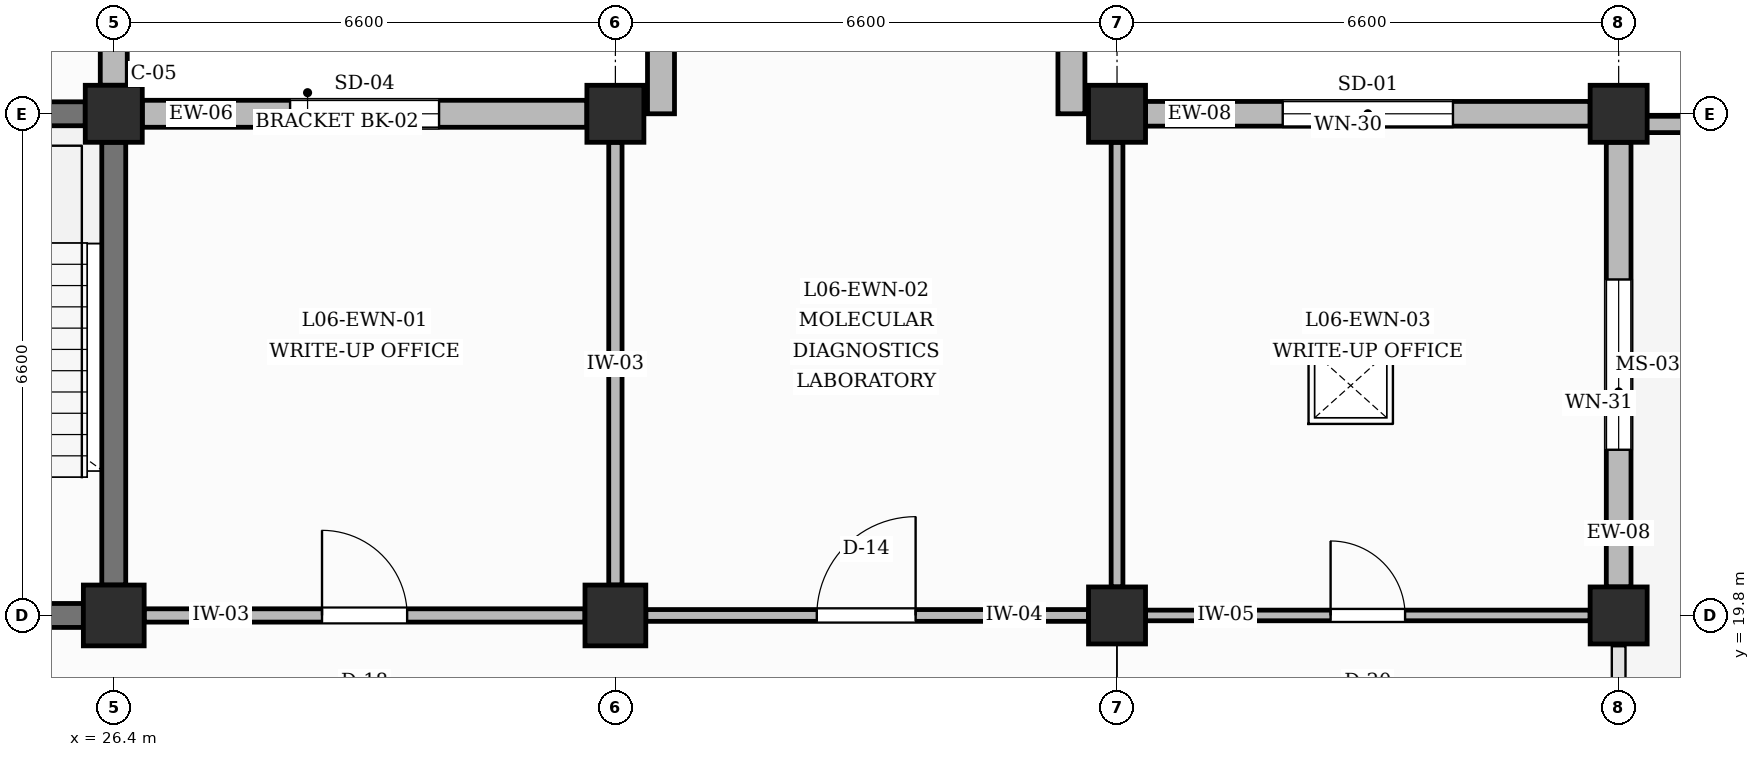
"""IFC4 building model, lengths in metres.
Left out: names, types, materials, properties, quantities, classifications, styles, units other than length and angle.
Written with IfcOpenShell. Run it as: python <this file> out.ifc"""

import sys

from ifc_helpers import new_model, si_unit, direction, frame, frame_2d, origin, origin_2d, place, context, subcontext, project, spatial, rectangle, extrude, element, fill, save


model = new_model("IFC4")
c1 = context("Model", 3, precision=1e-05, world=origin(), true_north=direction((0.0, 1.0)))
c2 = subcontext(c1, "Body", "Model", "MODEL_VIEW")
j1 = project(units=[si_unit("LENGTHUNIT", "METRE"), si_unit("PLANEANGLEUNIT", "RADIAN")], contexts=[c1])
p1 = place(None, origin())
s1 = spatial("IfcSite", under=j1, at=p1, CompositionType="ELEMENT")
p2 = place(p1, origin())
s2 = spatial("IfcBuilding", under=s1, at=p2, CompositionType="ELEMENT")
p3 = place(p2, frame((0.0, 0.0, 27.0)))
s3 = spatial("IfcBuildingStorey", under=s2, at=p3, CompositionType="ELEMENT", Elevation=27.0)
p4 = place(p3, frame((26.4, 19.8, 0.0), z_axis=(0.0, 0.0, 1.0), x_axis=(1.0, 0.0, 0.0)))
e1 = element("IfcColumn", 1, at=p4, inside=s3, PredefinedType="COLUMN", context=c2, shape_type="SweptSolid", body=[
    extrude(rectangle(XDim=0.8, YDim=0.8, at=origin_2d()), origin(), (0.0, 0.0, 1.0), 4.2),
])
p5 = place(p3, frame((26.4, 26.4, 0.0), z_axis=(0.0, 0.0, 1.0), x_axis=(1.0, 0.0, 0.0)))
e2 = element("IfcColumn", 2, at=p5, inside=s3, PredefinedType="COLUMN", context=c2, shape_type="SweptSolid", body=[
    extrude(rectangle(XDim=0.75, YDim=0.75, at=origin_2d()), origin(), (0.0, 0.0, 1.0), 4.2),
])
p6 = place(p3, frame((33.0, 19.8, 0.0), z_axis=(0.0, 0.0, 1.0), x_axis=(1.0, 0.0, 0.0)))
e3 = element("IfcColumn", 3, at=p6, inside=s3, PredefinedType="COLUMN", context=c2, shape_type="SweptSolid", body=[
    extrude(rectangle(XDim=0.8, YDim=0.8, at=origin_2d()), origin(), (0.0, 0.0, 1.0), 4.2),
])
for number, where, z_axis, x_axis in (
    (4, (33.0, 26.4, 0.0), (0.0, 0.0, 1.0), (1.0, 0.0, 0.0)),
    (5, (39.6, 19.8, 0.0), (0.0, 0.0, 1.0), (1.0, 0.0, 0.0)),
    (6, (39.6, 26.4, 0.0), (0.0, 0.0, 1.0), (1.0, 0.0, 0.0)),
    (7, (46.2, 19.8, 0.0), (0.0, 0.0, 1.0), (1.0, 0.0, 0.0)),
    (8, (46.2, 26.4, 0.0), (0.0, 0.0, 1.0), (1.0, 0.0, 0.0)),
):
    element("IfcColumn", number, at=place(p3, frame(where, z_axis=z_axis, x_axis=x_axis)), inside=s3, PredefinedType="COLUMN", context=c2, shape_type="SweptSolid", body=[
        extrude(rectangle(XDim=0.75, YDim=0.75, at=origin_2d()), origin(), (0.0, 0.0, 1.0), 4.2),
    ])
p7 = place(p3, frame((26.4, 26.775, 0.0), z_axis=(0.0, 0.0, 1.0), x_axis=(0.0, 1.0, 0.0)))
e9 = element("IfcWall", 9, at=p7, inside=s3, PredefinedType="SOLIDWALL", context=c2, shape_type="SweptSolid", body=[
    extrude(rectangle(XDim=5.85, YDim=0.355, at=frame_2d((2.925, 0.0))), origin(), (0.0, 0.0, 1.0), 3.27),
])
p8 = place(p7, frame((1.945, 0.0, 0.95)))
e10 = element("IfcOpeningElement", 10, at=p8, cuts=e9, PredefinedType="OPENING", context=c2, shape_type="SweptSolid", body=[
    extrude(rectangle(XDim=1.96, YDim=1.3, at=frame_2d((0.98, 0.65))), frame((0.0, 0.188, 0.0), z_axis=(0.0, -1.0, 0.0), x_axis=(1.0, 0.0, 0.0)), (0.0, 0.0, 1.0), 0.375),
])
p9 = place(p3, frame((26.775, 26.4, 0.0), z_axis=(0.0, 0.0, 1.0), x_axis=(1.0, 0.0, 0.0)))
e11 = element("IfcWall", 11, at=p9, inside=s3, PredefinedType="SOLIDWALL", context=c2, shape_type="SweptSolid", body=[
    extrude(rectangle(XDim=5.85, YDim=0.355, at=frame_2d((2.925, 0.0))), origin(), (0.0, 0.0, 1.0), 3.27),
])
p10 = place(p9, frame((1.945, 0.0, 0.95)))
e12 = element("IfcOpeningElement", 12, at=p10, cuts=e11, PredefinedType="OPENING", context=c2, shape_type="SweptSolid", body=[
    extrude(rectangle(XDim=1.96, YDim=1.96, at=frame_2d((0.98, 0.98))), frame((0.0, 0.188, 0.0), z_axis=(0.0, -1.0, 0.0), x_axis=(1.0, 0.0, 0.0)), (0.0, 0.0, 1.0), 0.375),
])
for number, where, z_axis, x_axis in (
    (13, (33.6, 26.4, 0.0), (0.0, 0.0, 1.0), (0.0, 1.0, 0.0)),
    (14, (39.0, 26.4, 0.0), (0.0, 0.0, 1.0), (0.0, 1.0, 0.0)),
):
    element("IfcWall", number, at=place(p3, frame(where, z_axis=z_axis, x_axis=x_axis)), inside=s3, PredefinedType="SOLIDWALL", context=c2, shape_type="SweptSolid", body=[
        extrude(rectangle(XDim=2.0, YDim=0.355, at=frame_2d((1.0, 0.0))), origin(), (0.0, 0.0, 1.0), 3.27),
    ])
p11 = place(p3, frame((39.975, 26.4, 0.0), z_axis=(0.0, 0.0, 1.0), x_axis=(1.0, 0.0, 0.0)))
e15 = element("IfcWall", 15, at=p11, inside=s3, PredefinedType="SOLIDWALL", context=c2, shape_type="SweptSolid", body=[
    extrude(rectangle(XDim=5.85, YDim=0.325, at=frame_2d((2.925, 0.0))), origin(), (0.0, 0.0, 1.0), 3.27),
])
p12 = place(p11, frame((1.805, 0.0, 0.95)))
e16 = element("IfcOpeningElement", 16, at=p12, cuts=e15, PredefinedType="OPENING", context=c2, shape_type="SweptSolid", body=[
    extrude(rectangle(XDim=2.24, YDim=1.52, at=frame_2d((1.12, 0.76))), frame((0.0, 0.172, 0.0), z_axis=(0.0, -1.0, 0.0), x_axis=(1.0, 0.0, 0.0)), (0.0, 0.0, 1.0), 0.345),
])
p13 = place(p3, frame((46.2, 20.175, 0.0), z_axis=(0.0, 0.0, 1.0), x_axis=(0.0, 1.0, 0.0)))
e17 = element("IfcWall", 17, at=p13, inside=s3, PredefinedType="SOLIDWALL", context=c2, shape_type="SweptSolid", body=[
    extrude(rectangle(XDim=5.85, YDim=0.325, at=frame_2d((2.925, 0.0))), origin(), (0.0, 0.0, 1.0), 3.27),
])
p14 = place(p13, frame((1.805, 0.0, 0.95)))
e18 = element("IfcOpeningElement", 18, at=p14, cuts=e17, PredefinedType="OPENING", context=c2, shape_type="SweptSolid", body=[
    extrude(rectangle(XDim=2.24, YDim=1.74, at=frame_2d((1.12, 0.87))), frame((0.0, 0.172, 0.0), z_axis=(0.0, -1.0, 0.0), x_axis=(1.0, 0.0, 0.0)), (0.0, 0.0, 1.0), 0.345),
])
p15 = place(p3, frame((46.34, 26.26, 0.0), z_axis=(0.0, 0.0, 1.0), x_axis=(1.0, 0.0, 0.0)))
e19 = element("IfcWall", 19, at=p15, inside=s3, PredefinedType="PARAPET", context=c2, shape_type="SweptSolid", body=[
    extrude(rectangle(XDim=6.32, YDim=0.215, at=frame_2d((3.16, 0.0))), origin(), (0.0, 0.0, 1.0), 1.15),
])
p16 = place(p3, frame((20.2, 19.8, 0.0), z_axis=(0.0, 0.0, 1.0), x_axis=(1.0, 0.0, 0.0)))
e20 = element("IfcWall", 20, at=p16, inside=s3, PredefinedType="SHEAR", context=c2, shape_type="SweptSolid", body=[
    extrude(rectangle(XDim=5.8, YDim=0.315, at=frame_2d((2.9, 0.0))), origin(), (0.0, 0.0, 1.0), 3.17),
])
p17 = place(p16, frame((2.325, 0.0, 0.0)))
e21 = element("IfcOpeningElement", 21, at=p17, cuts=e20, PredefinedType="OPENING", context=c2, shape_type="SweptSolid", body=[
    extrude(rectangle(XDim=1.15, YDim=2.2, at=frame_2d((0.575, 1.1))), frame((0.0, 0.167, 0.0), z_axis=(0.0, -1.0, 0.0), x_axis=(1.0, 0.0, 0.0)), (0.0, 0.0, 1.0), 0.335),
])
for number, where, z_axis, x_axis in (
    (22, (20.2, 26.4, 0.0), (0.0, 0.0, 1.0), (1.0, 0.0, 0.0)),
    (23, (26.4, 20.2, 0.0), (0.0, 0.0, 1.0), (0.0, 1.0, 0.0)),
):
    element("IfcWall", number, at=place(p3, frame(where, z_axis=z_axis, x_axis=x_axis)), inside=s3, PredefinedType="SHEAR", context=c2, shape_type="SweptSolid", body=[
        extrude(rectangle(XDim=5.825, YDim=0.315, at=frame_2d((2.913, 0.0))), origin(), (0.0, 0.0, 1.0), 3.17),
    ])
p18 = place(p3, frame((26.8, 19.8, 0.0), z_axis=(0.0, 0.0, 1.0), x_axis=(1.0, 0.0, 0.0)))
e24 = element("IfcWall", 24, at=p18, inside=s3, PredefinedType="PARTITIONING", context=c2, shape_type="SweptSolid", body=[
    extrude(rectangle(XDim=5.8, YDim=0.175, at=frame_2d((2.9, 0.0))), origin(), (0.0, 0.0, 1.0), 3.17),
])
p19 = place(p18, frame((2.34, 0.0, 0.0)))
e25 = element("IfcOpeningElement", 25, at=p19, cuts=e24, PredefinedType="OPENING", context=c2, shape_type="SweptSolid", body=[
    extrude(rectangle(XDim=1.12, YDim=2.2, at=frame_2d((0.56, 1.1))), frame((0.0, 0.097, 0.0), z_axis=(0.0, -1.0, 0.0), x_axis=(1.0, 0.0, 0.0)), (0.0, 0.0, 1.0), 0.195),
])
p20 = place(p3, frame((33.0, 20.2, 0.0), z_axis=(0.0, 0.0, 1.0), x_axis=(0.0, 1.0, 0.0)))
e26 = element("IfcWall", 26, at=p20, inside=s3, PredefinedType="PARTITIONING", context=c2, shape_type="SweptSolid", body=[
    extrude(rectangle(XDim=5.825, YDim=0.175, at=frame_2d((2.913, 0.0))), origin(), (0.0, 0.0, 1.0), 3.42),
])
p21 = place(p3, frame((33.4, 19.8, 0.0), z_axis=(0.0, 0.0, 1.0), x_axis=(1.0, 0.0, 0.0)))
e27 = element("IfcWall", 27, at=p21, inside=s3, PredefinedType="PARTITIONING", context=c2, shape_type="SweptSolid", body=[
    extrude(rectangle(XDim=5.825, YDim=0.155, at=frame_2d((2.913, 0.0))), origin(), (0.0, 0.0, 1.0), 3.17),
])
p22 = place(p21, frame((2.25, 0.0, 0.0)))
e28 = element("IfcOpeningElement", 28, at=p22, cuts=e27, PredefinedType="OPENING", context=c2, shape_type="SweptSolid", body=[
    extrude(rectangle(XDim=1.3, YDim=2.3, at=frame_2d((0.65, 1.15))), frame((0.0, 0.087, 0.0), z_axis=(0.0, -1.0, 0.0), x_axis=(1.0, 0.0, 0.0)), (0.0, 0.0, 1.0), 0.175),
])
p23 = place(p3, frame((39.6, 20.175, 0.0), z_axis=(0.0, 0.0, 1.0), x_axis=(0.0, 1.0, 0.0)))
e29 = element("IfcWall", 29, at=p23, inside=s3, PredefinedType="PARTITIONING", context=c2, shape_type="SweptSolid", body=[
    extrude(rectangle(XDim=5.85, YDim=0.155, at=frame_2d((2.925, 0.0))), origin(), (0.0, 0.0, 1.0), 3.42),
])
p24 = place(p3, frame((39.975, 19.8, 0.0), z_axis=(0.0, 0.0, 1.0), x_axis=(1.0, 0.0, 0.0)))
e30 = element("IfcWall", 30, at=p24, inside=s3, PredefinedType="PARTITIONING", context=c2, shape_type="SweptSolid", body=[
    extrude(rectangle(XDim=5.85, YDim=0.14, at=frame_2d((2.925, 0.0))), origin(), (0.0, 0.0, 1.0), 3.17),
])
p25 = place(p24, frame((2.435, 0.0, 0.0)))
e31 = element("IfcOpeningElement", 31, at=p25, cuts=e30, PredefinedType="OPENING", context=c2, shape_type="SweptSolid", body=[
    extrude(rectangle(XDim=0.98, YDim=2.15, at=frame_2d((0.49, 1.075))), frame((0.0, 0.08, 0.0), z_axis=(0.0, -1.0, 0.0), x_axis=(1.0, 0.0, 0.0)), (0.0, 0.0, 1.0), 0.16),
])
p26 = place(p10, origin())
e32 = element("IfcWindow", 32, at=p26, inside=s3, PartitioningType="DOUBLE_PANEL_VERTICAL", PredefinedType="WINDOW", context=c2, shape_type="SweptSolid", body=[
    extrude(rectangle(XDim=1.96, YDim=1.96, at=frame_2d((0.98, 0.98))), frame((0.0, 0.03, 0.0), z_axis=(0.0, -1.0, 0.0), x_axis=(1.0, 0.0, 0.0)), (0.0, 0.0, 1.0), 0.06),
])
fill(e12, e32)
p27 = place(p12, origin())
e33 = element("IfcWindow", 33, at=p27, inside=s3, PartitioningType="DOUBLE_PANEL_VERTICAL", PredefinedType="WINDOW", context=c2, shape_type="SweptSolid", body=[
    extrude(rectangle(XDim=2.24, YDim=1.52, at=frame_2d((1.12, 0.76))), frame((0.0, 0.03, 0.0), z_axis=(0.0, -1.0, 0.0), x_axis=(1.0, 0.0, 0.0)), (0.0, 0.0, 1.0), 0.06),
])
fill(e16, e33)
p28 = place(p14, origin())
e34 = element("IfcWindow", 34, at=p28, inside=s3, PartitioningType="DOUBLE_PANEL_VERTICAL", PredefinedType="WINDOW", context=c2, shape_type="SweptSolid", body=[
    extrude(rectangle(XDim=2.24, YDim=1.74, at=frame_2d((1.12, 0.87))), frame((0.0, 0.03, 0.0), z_axis=(0.0, -1.0, 0.0), x_axis=(1.0, 0.0, 0.0)), (0.0, 0.0, 1.0), 0.06),
])
fill(e18, e34)
p29 = place(p19, origin())
e35 = element("IfcDoor", 35, at=p29, inside=s3, OperationType="SINGLE_SWING_LEFT", PredefinedType="DOOR", context=c2, shape_type="SweptSolid", body=[
    extrude(rectangle(XDim=1.12, YDim=2.2, at=frame_2d((0.56, 1.1))), frame((0.0, 0.025, 0.0), z_axis=(0.0, -1.0, 0.0), x_axis=(1.0, 0.0, 0.0)), (0.0, 0.0, 1.0), 0.05),
])
fill(e25, e35)
p30 = place(p22, origin())
e36 = element("IfcDoor", 36, at=p30, inside=s3, OperationType="SINGLE_SWING_RIGHT", PredefinedType="DOOR", context=c2, shape_type="SweptSolid", body=[
    extrude(rectangle(XDim=1.3, YDim=2.3, at=frame_2d((0.65, 1.15))), frame((0.0, 0.025, 0.0), z_axis=(0.0, -1.0, 0.0), x_axis=(1.0, 0.0, 0.0)), (0.0, 0.0, 1.0), 0.05),
])
fill(e28, e36)
p31 = place(p25, origin())
e37 = element("IfcDoor", 37, at=p31, inside=s3, OperationType="SINGLE_SWING_LEFT", PredefinedType="DOOR", context=c2, shape_type="SweptSolid", body=[
    extrude(rectangle(XDim=0.98, YDim=2.15, at=frame_2d((0.49, 1.075))), frame((0.0, 0.025, 0.0), z_axis=(0.0, -1.0, 0.0), x_axis=(1.0, 0.0, 0.0)), (0.0, 0.0, 1.0), 0.05),
])
fill(e31, e37)
save(model, sys.argv[1])
